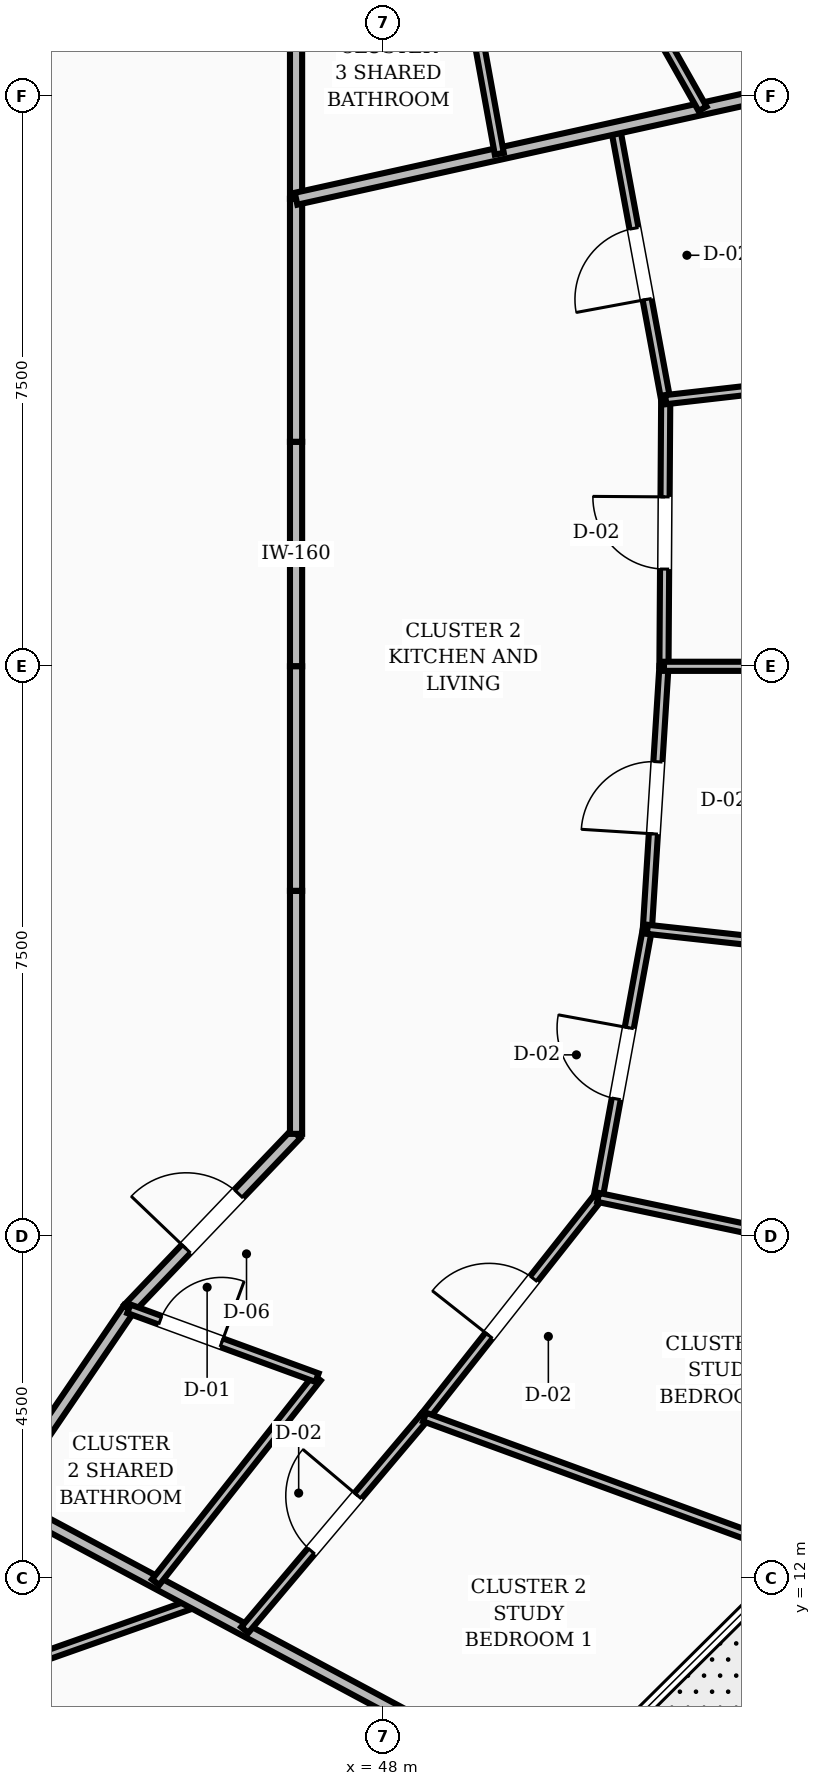
"""IFC4 building model, lengths in metres.
Left out: names, types, materials, properties, quantities, classifications, styles, units other than length and angle.
Written with IfcOpenShell. Run it as: python <this file> out.ifc"""

import sys

from ifc_helpers import new_model, si_unit, direction, frame, frame_2d, origin, place, context, subcontext, project, spatial, rectangle, extrude, element, fill, save


model = new_model("IFC4")
c1 = context("Model", 3, precision=1e-05, world=origin(), true_north=direction((0.0, 1.0)))
c2 = subcontext(c1, "Body", "Model", "MODEL_VIEW")
j1 = project(units=[si_unit("LENGTHUNIT", "METRE"), si_unit("PLANEANGLEUNIT", "RADIAN")], contexts=[c1])
p1 = place(None, origin())
s1 = spatial("IfcSite", under=j1, at=p1, CompositionType="ELEMENT")
p2 = place(p1, origin())
s2 = spatial("IfcBuilding", under=s1, at=p2, CompositionType="ELEMENT")
p3 = place(p2, frame((0.0, 0.0, 146.0)))
s3 = spatial("IfcBuildingStorey", under=s2, at=p3, CompositionType="ELEMENT", Elevation=146.0)
p4 = place(p3, frame((46.85, 24.0, 0.0), z_axis=(0.0, 0.0, 1.0), x_axis=(0.0, 1.0, 0.0)))
e1 = element("IfcWall", 1, at=p4, inside=s3, PredefinedType="SOLIDWALL", context=c2, shape_type="SweptSolid", body=[
    extrude(rectangle(XDim=2.954, YDim=0.16, at=frame_2d((1.477, 0.0))), origin(), (0.0, 0.0, 1.0), 2.8),
])
p5 = place(p3, frame((46.85, 26.954, 0.0), z_axis=(0.0, 0.0, 1.0), x_axis=(0.0, 1.0, 0.0)))
e2 = element("IfcWall", 2, at=p5, inside=s3, PredefinedType="SOLIDWALL", context=c2, shape_type="SweptSolid", body=[
    extrude(rectangle(XDim=3.197, YDim=0.16, at=frame_2d((1.599, 0.0))), origin(), (0.0, 0.0, 1.0), 2.8),
])
p6 = place(p3, frame((46.85, 30.151, 0.0), z_axis=(0.0, 0.0, 1.0), x_axis=(0.0, 1.0, 0.0)))
e3 = element("IfcWall", 3, at=p6, inside=s3, PredefinedType="SOLIDWALL", context=c2, shape_type="SweptSolid", body=[
    extrude(rectangle(XDim=3.771, YDim=0.16, at=frame_2d((1.886, 0.0))), origin(), (0.0, 0.0, 1.0), 2.8),
])
p7 = place(p3, frame((42.95, 13.05, 0.0), z_axis=(0.0, 0.0, 1.0), x_axis=(0.562674669208, 0.826678423955, 0.0)))
e4 = element("IfcWall", 4, at=p7, inside=s3, PredefinedType="SOLIDWALL", context=c2, shape_type="SweptSolid", body=[
    extrude(rectangle(XDim=3.021, YDim=0.16, at=frame_2d((1.511, 0.0))), origin(), (0.0, 0.0, 1.0), 2.8),
])
p8 = place(p3, frame((44.65, 15.548, 0.0), z_axis=(0.0, 0.0, 1.0), x_axis=(0.691055487108, 0.722801711216, 0.0)))
e5 = element("IfcWall", 5, at=p8, inside=s3, PredefinedType="SOLIDWALL", context=c2, shape_type="SweptSolid", body=[
    extrude(rectangle(XDim=3.184, YDim=0.16, at=frame_2d((1.592, 0.0))), origin(), (0.0, 0.0, 1.0), 2.8),
])
p9 = place(p8, frame((1.092, 0.0, 0.0)))
e6 = element("IfcOpeningElement", 6, at=p9, cuts=e5, PredefinedType="OPENING", context=c2, shape_type="SweptSolid", body=[
    extrude(rectangle(XDim=1.0, YDim=2.1, at=frame_2d((0.5, 1.05))), frame((0.0, 0.09, 0.0), z_axis=(0.0, -1.0, 0.0), x_axis=(1.0, 0.0, 0.0)), (0.0, 0.0, 1.0), 0.18),
])
p10 = place(p3, frame((46.85, 17.849, 0.0), z_axis=(0.0, 0.0, 1.0), x_axis=(0.0, 1.0, 0.0)))
e7 = element("IfcWall", 7, at=p10, inside=s3, PredefinedType="SOLIDWALL", context=c2, shape_type="SweptSolid", body=[
    extrude(rectangle(XDim=3.197, YDim=0.16, at=frame_2d((1.599, 0.0))), origin(), (0.0, 0.0, 1.0), 2.8),
])
p11 = place(p3, frame((46.85, 21.046, 0.0), z_axis=(0.0, 0.0, 1.0), x_axis=(0.0, 1.0, 0.0)))
e8 = element("IfcWall", 8, at=p11, inside=s3, PredefinedType="SOLIDWALL", context=c2, shape_type="SweptSolid", body=[
    extrude(rectangle(XDim=2.954, YDim=0.16, at=frame_2d((1.477, 0.0))), origin(), (0.0, 0.0, 1.0), 2.8),
])
p12 = place(p3, frame((42.0, 10.435, 0.0), z_axis=(0.0, 0.0, 1.0), x_axis=(0.942997587187, 0.332799565145, 0.0)))
e9 = element("IfcWall", 9, at=p12, inside=s3, PredefinedType="PARTITIONING", context=c2, shape_type="SweptSolid", body=[
    extrude(rectangle(XDim=3.728, YDim=0.12, at=frame_2d((1.864, 0.0))), origin(), (0.0, 0.0, 1.0), 2.8),
])
p13 = place(p3, frame((42.95, 13.05, 0.0), z_axis=(0.0, 0.0, 1.0), x_axis=(0.881439566777, -0.472296824169, 0.0)))
e10 = element("IfcWall", 10, at=p13, inside=s3, PredefinedType="SOLIDWALL", context=c2, shape_type="SweptSolid", body=[
    extrude(rectangle(XDim=8.265, YDim=0.16, at=frame_2d((4.133, 0.0))), origin(), (0.0, 0.0, 1.0), 2.8),
])
p14 = place(p3, frame((45.002, 11.95, 0.0), z_axis=(0.0, 0.0, 1.0), x_axis=(0.619575015098, 0.784937450162, 0.0)))
e11 = element("IfcWall", 11, at=p14, inside=s3, PredefinedType="PARTITIONING", context=c2, shape_type="SweptSolid", body=[
    extrude(rectangle(XDim=3.428, YDim=0.12, at=frame_2d((1.714, 0.0))), origin(), (0.0, 0.0, 1.0), 2.8),
])
p15 = place(p3, frame((44.65, 15.548, 0.0), z_axis=(0.0, 0.0, 1.0), x_axis=(0.93908860173, -0.343675134538, 0.0)))
e12 = element("IfcWall", 12, at=p15, inside=s3, PredefinedType="PARTITIONING", context=c2, shape_type="SweptSolid", body=[
    extrude(rectangle(XDim=2.637, YDim=0.12, at=frame_2d((1.318, 0.0))), origin(), (0.0, 0.0, 1.0), 2.8),
])
p16 = place(p15, frame((0.44, 0.0, 0.0)))
e13 = element("IfcOpeningElement", 13, at=p16, cuts=e12, PredefinedType="OPENING", context=c2, shape_type="SweptSolid", body=[
    extrude(rectangle(XDim=0.86, YDim=2.1, at=frame_2d((0.43, 1.05))), frame((0.0, 0.07, 0.0), z_axis=(0.0, -1.0, 0.0), x_axis=(1.0, 0.0, 0.0)), (0.0, 0.0, 1.0), 0.14),
])
p17 = place(p3, frame((46.175, 11.322, 0.0), z_axis=(0.0, 0.0, 1.0), x_axis=(0.645297395585, 0.763931457169, 0.0)))
e14 = element("IfcWall", 14, at=p17, inside=s3, PredefinedType="PARTITIONING", context=c2, shape_type="SweptSolid", body=[
    extrude(rectangle(XDim=3.667, YDim=0.12, at=frame_2d((1.833, 0.0))), origin(), (0.0, 0.0, 1.0), 2.8),
])
p18 = place(p17, frame((1.359, 0.0, 0.0)))
e15 = element("IfcOpeningElement", 15, at=p18, cuts=e14, PredefinedType="OPENING", context=c2, shape_type="SweptSolid", body=[
    extrude(rectangle(XDim=0.95, YDim=2.1, at=frame_2d((0.475, 1.05))), frame((0.0, 0.07, 0.0), z_axis=(0.0, -1.0, 0.0), x_axis=(1.0, 0.0, 0.0)), (0.0, 0.0, 1.0), 0.14),
])
p19 = place(p3, frame((48.541, 14.124, 0.0), z_axis=(0.0, 0.0, 1.0), x_axis=(0.620026847561, 0.784580593887, 0.0)))
e16 = element("IfcWall", 16, at=p19, inside=s3, PredefinedType="PARTITIONING", context=c2, shape_type="SweptSolid", body=[
    extrude(rectangle(XDim=3.682, YDim=0.12, at=frame_2d((1.841, 0.0))), origin(), (0.0, 0.0, 1.0), 2.8),
])
p20 = place(p19, frame((1.366, 0.0, 0.0)))
e17 = element("IfcOpeningElement", 17, at=p20, cuts=e16, PredefinedType="OPENING", context=c2, shape_type="SweptSolid", body=[
    extrude(rectangle(XDim=0.95, YDim=2.1, at=frame_2d((0.475, 1.05))), frame((0.0, 0.07, 0.0), z_axis=(0.0, -1.0, 0.0), x_axis=(1.0, 0.0, 0.0)), (0.0, 0.0, 1.0), 0.14),
])
p21 = place(p3, frame((48.541, 14.124, 0.0), z_axis=(0.0, 0.0, 1.0), x_axis=(0.939099678482, -0.343644865924, 0.0)))
e18 = element("IfcWall", 18, at=p21, inside=s3, PredefinedType="PARTITIONING", context=c2, shape_type="SweptSolid", body=[
    extrude(rectangle(XDim=5.224, YDim=0.12, at=frame_2d((2.612, 0.0))), origin(), (0.0, 0.0, 1.0), 2.8),
])
p22 = place(p3, frame((50.824, 17.013, 0.0), z_axis=(0.0, 0.0, 1.0), x_axis=(0.180484851733, 0.983577764234, 0.0)))
e19 = element("IfcWall", 19, at=p22, inside=s3, PredefinedType="PARTITIONING", context=c2, shape_type="SweptSolid", body=[
    extrude(rectangle(XDim=3.586, YDim=0.12, at=frame_2d((1.793, 0.0))), origin(), (0.0, 0.0, 1.0), 2.8),
])
p23 = place(p22, frame((1.318, 0.0, 0.0)))
e20 = element("IfcOpeningElement", 20, at=p23, cuts=e19, PredefinedType="OPENING", context=c2, shape_type="SweptSolid", body=[
    extrude(rectangle(XDim=0.95, YDim=2.1, at=frame_2d((0.475, 1.05))), frame((0.0, 0.07, 0.0), z_axis=(0.0, -1.0, 0.0), x_axis=(1.0, 0.0, 0.0)), (0.0, 0.0, 1.0), 0.14),
])
p24 = place(p3, frame((50.824, 17.013, 0.0), z_axis=(0.0, 0.0, 1.0), x_axis=(0.978584181815, -0.2058470284, 0.0)))
e21 = element("IfcWall", 21, at=p24, inside=s3, PredefinedType="PARTITIONING", context=c2, shape_type="SweptSolid", body=[
    extrude(rectangle(XDim=5.119, YDim=0.12, at=frame_2d((2.56, 0.0))), origin(), (0.0, 0.0, 1.0), 2.8),
])
p25 = place(p3, frame((51.472, 20.54, 0.0), z_axis=(0.0, 0.0, 1.0), x_axis=(0.063022706804, 0.998012093327, 0.0)))
e22 = element("IfcWall", 22, at=p25, inside=s3, PredefinedType="PARTITIONING", context=c2, shape_type="SweptSolid", body=[
    extrude(rectangle(XDim=3.467, YDim=0.12, at=frame_2d((1.733, 0.0))), origin(), (0.0, 0.0, 1.0), 2.8),
])
p26 = place(p25, frame((1.259, 0.0, 0.0)))
e23 = element("IfcOpeningElement", 23, at=p26, cuts=e22, PredefinedType="OPENING", context=c2, shape_type="SweptSolid", body=[
    extrude(rectangle(XDim=0.95, YDim=2.1, at=frame_2d((0.475, 1.05))), frame((0.0, 0.07, 0.0), z_axis=(0.0, -1.0, 0.0), x_axis=(1.0, 0.0, 0.0)), (0.0, 0.0, 1.0), 0.14),
])
p27 = place(p3, frame((51.472, 20.54, 0.0), z_axis=(0.0, 0.0, 1.0), x_axis=(0.994053548393, -0.10889234559, 0.0)))
e24 = element("IfcWall", 24, at=p27, inside=s3, PredefinedType="PARTITIONING", context=c2, shape_type="SweptSolid", body=[
    extrude(rectangle(XDim=5.867, YDim=0.12, at=frame_2d((2.934, 0.0))), origin(), (0.0, 0.0, 1.0), 2.8),
])
p28 = place(p3, frame((51.69, 24.0, 0.0), z_axis=(0.0, 0.0, 1.0), x_axis=(0.006610850666, 0.999978148088, 0.0)))
e25 = element("IfcWall", 25, at=p28, inside=s3, PredefinedType="PARTITIONING", context=c2, shape_type="SweptSolid", body=[
    extrude(rectangle(XDim=3.508, YDim=0.12, at=frame_2d((1.754, 0.0))), origin(), (0.0, 0.0, 1.0), 2.8),
])
p29 = place(p28, frame((1.279, 0.0, 0.0)))
e26 = element("IfcOpeningElement", 26, at=p29, cuts=e25, PredefinedType="OPENING", context=c2, shape_type="SweptSolid", body=[
    extrude(rectangle(XDim=0.95, YDim=2.1, at=frame_2d((0.475, 1.05))), frame((0.0, 0.07, 0.0), z_axis=(0.0, -1.0, 0.0), x_axis=(1.0, 0.0, 0.0)), (0.0, 0.0, 1.0), 0.14),
])
p30 = place(p3, frame((51.69, 24.0, 0.0), z_axis=(0.0, 0.0, 1.0), x_axis=(1.0, 0.0, 0.0)))
e27 = element("IfcWall", 27, at=p30, inside=s3, PredefinedType="PARTITIONING", context=c2, shape_type="SweptSolid", body=[
    extrude(rectangle(XDim=6.11, YDim=0.12, at=frame_2d((3.055, 0.0))), origin(), (0.0, 0.0, 1.0), 2.8),
])
p31 = place(p3, frame((51.713, 27.508, 0.0), z_axis=(0.0, 0.0, 1.0), x_axis=(-0.182000245683, 0.983298484984, 0.0)))
e28 = element("IfcWall", 28, at=p31, inside=s3, PredefinedType="PARTITIONING", context=c2, shape_type="SweptSolid", body=[
    extrude(rectangle(XDim=3.634, YDim=0.12, at=frame_2d((1.817, 0.0))), origin(), (0.0, 0.0, 1.0), 2.8),
])
p32 = place(p31, frame((1.342, 0.0, 0.0)))
e29 = element("IfcOpeningElement", 29, at=p32, cuts=e28, PredefinedType="OPENING", context=c2, shape_type="SweptSolid", body=[
    extrude(rectangle(XDim=0.95, YDim=2.1, at=frame_2d((0.475, 1.05))), frame((0.0, 0.07, 0.0), z_axis=(0.0, -1.0, 0.0), x_axis=(1.0, 0.0, 0.0)), (0.0, 0.0, 1.0), 0.14),
])
p33 = place(p3, frame((51.713, 27.508, 0.0), z_axis=(0.0, 0.0, 1.0), x_axis=(0.993569040849, 0.113227916461, 0.0)))
e30 = element("IfcWall", 30, at=p33, inside=s3, PredefinedType="PARTITIONING", context=c2, shape_type="SweptSolid", body=[
    extrude(rectangle(XDim=6.18, YDim=0.12, at=frame_2d((3.09, 0.0))), origin(), (0.0, 0.0, 1.0), 2.8),
])
p34 = place(p3, frame((46.85, 30.151, 0.0), z_axis=(0.0, 0.0, 1.0), x_axis=(0.976352651254, 0.216183950352, 0.0)))
e31 = element("IfcWall", 31, at=p34, inside=s3, PredefinedType="SOLIDWALL", context=c2, shape_type="SweptSolid", body=[
    extrude(rectangle(XDim=9.731, YDim=0.16, at=frame_2d((4.866, 0.0))), origin(), (0.0, 0.0, 1.0), 2.8),
])
p35 = place(p3, frame((49.524, 30.743, 0.0), z_axis=(0.0, 0.0, 1.0), x_axis=(-0.178705579988, 0.98390259461, 0.0)))
e32 = element("IfcWall", 32, at=p35, inside=s3, PredefinedType="PARTITIONING", context=c2, shape_type="SweptSolid", body=[
    extrude(rectangle(XDim=3.823, YDim=0.12, at=frame_2d((1.911, 0.0))), origin(), (0.0, 0.0, 1.0), 2.8),
])
p36 = place(p3, frame((52.198, 31.335, 0.0), z_axis=(0.0, 0.0, 1.0), x_axis=(-0.491634094676, 0.870801881574, 0.0)))
e33 = element("IfcWall", 33, at=p36, inside=s3, PredefinedType="PARTITIONING", context=c2, shape_type="SweptSolid", body=[
    extrude(rectangle(XDim=8.043, YDim=0.12, at=frame_2d((4.021, 0.0))), origin(), (0.0, 0.0, 1.0), 2.8),
])
p37 = place(p36, frame((4.913, 0.0, 0.0)))
e34 = element("IfcOpeningElement", 34, at=p37, cuts=e33, PredefinedType="OPENING", context=c2, shape_type="SweptSolid", body=[
    extrude(rectangle(XDim=0.95, YDim=2.1, at=frame_2d((0.475, 1.05))), frame((0.0, 0.07, 0.0), z_axis=(0.0, -1.0, 0.0), x_axis=(1.0, 0.0, 0.0)), (0.0, 0.0, 1.0), 0.14),
])
p38 = place(p16, origin())
e35 = element("IfcDoor", 35, at=p38, inside=s3, OperationType="SINGLE_SWING_RIGHT", PredefinedType="DOOR", context=c2, shape_type="SweptSolid", body=[
    extrude(rectangle(XDim=0.86, YDim=2.1, at=frame_2d((0.43, 1.05))), frame((0.0, 0.025, 0.0), z_axis=(0.0, -1.0, 0.0), x_axis=(1.0, 0.0, 0.0)), (0.0, 0.0, 1.0), 0.05),
])
fill(e13, e35)
p39 = place(p9, origin())
e36 = element("IfcDoor", 36, at=p39, inside=s3, OperationType="SINGLE_SWING_LEFT", PredefinedType="DOOR", context=c2, shape_type="SweptSolid", body=[
    extrude(rectangle(XDim=1.0, YDim=2.1, at=frame_2d((0.5, 1.05))), frame((0.0, 0.025, 0.0), z_axis=(0.0, -1.0, 0.0), x_axis=(1.0, 0.0, 0.0)), (0.0, 0.0, 1.0), 0.05),
])
fill(e6, e36)
p40 = place(p18, origin())
e37 = element("IfcDoor", 37, at=p40, inside=s3, OperationType="SINGLE_SWING_RIGHT", PredefinedType="DOOR", context=c2, shape_type="SweptSolid", body=[
    extrude(rectangle(XDim=0.95, YDim=2.1, at=frame_2d((0.475, 1.05))), frame((0.0, 0.025, 0.0), z_axis=(0.0, -1.0, 0.0), x_axis=(1.0, 0.0, 0.0)), (0.0, 0.0, 1.0), 0.05),
])
fill(e15, e37)
p41 = place(p20, origin())
e38 = element("IfcDoor", 38, at=p41, inside=s3, OperationType="SINGLE_SWING_LEFT", PredefinedType="DOOR", context=c2, shape_type="SweptSolid", body=[
    extrude(rectangle(XDim=0.95, YDim=2.1, at=frame_2d((0.475, 1.05))), frame((0.0, 0.025, 0.0), z_axis=(0.0, -1.0, 0.0), x_axis=(1.0, 0.0, 0.0)), (0.0, 0.0, 1.0), 0.05),
])
fill(e17, e38)
p42 = place(p23, origin())
e39 = element("IfcDoor", 39, at=p42, inside=s3, OperationType="SINGLE_SWING_RIGHT", PredefinedType="DOOR", context=c2, shape_type="SweptSolid", body=[
    extrude(rectangle(XDim=0.95, YDim=2.1, at=frame_2d((0.475, 1.05))), frame((0.0, 0.025, 0.0), z_axis=(0.0, -1.0, 0.0), x_axis=(1.0, 0.0, 0.0)), (0.0, 0.0, 1.0), 0.05),
])
fill(e20, e39)
p43 = place(p26, origin())
e40 = element("IfcDoor", 40, at=p43, inside=s3, OperationType="SINGLE_SWING_LEFT", PredefinedType="DOOR", context=c2, shape_type="SweptSolid", body=[
    extrude(rectangle(XDim=0.95, YDim=2.1, at=frame_2d((0.475, 1.05))), frame((0.0, 0.025, 0.0), z_axis=(0.0, -1.0, 0.0), x_axis=(1.0, 0.0, 0.0)), (0.0, 0.0, 1.0), 0.05),
])
fill(e23, e40)
p44 = place(p29, origin())
e41 = element("IfcDoor", 41, at=p44, inside=s3, OperationType="SINGLE_SWING_RIGHT", PredefinedType="DOOR", context=c2, shape_type="SweptSolid", body=[
    extrude(rectangle(XDim=0.95, YDim=2.1, at=frame_2d((0.475, 1.05))), frame((0.0, 0.025, 0.0), z_axis=(0.0, -1.0, 0.0), x_axis=(1.0, 0.0, 0.0)), (0.0, 0.0, 1.0), 0.05),
])
fill(e26, e41)
p45 = place(p32, origin())
e42 = element("IfcDoor", 42, at=p45, inside=s3, OperationType="SINGLE_SWING_LEFT", PredefinedType="DOOR", context=c2, shape_type="SweptSolid", body=[
    extrude(rectangle(XDim=0.95, YDim=2.1, at=frame_2d((0.475, 1.05))), frame((0.0, 0.025, 0.0), z_axis=(0.0, -1.0, 0.0), x_axis=(1.0, 0.0, 0.0)), (0.0, 0.0, 1.0), 0.05),
])
fill(e29, e42)
save(model, sys.argv[1])
